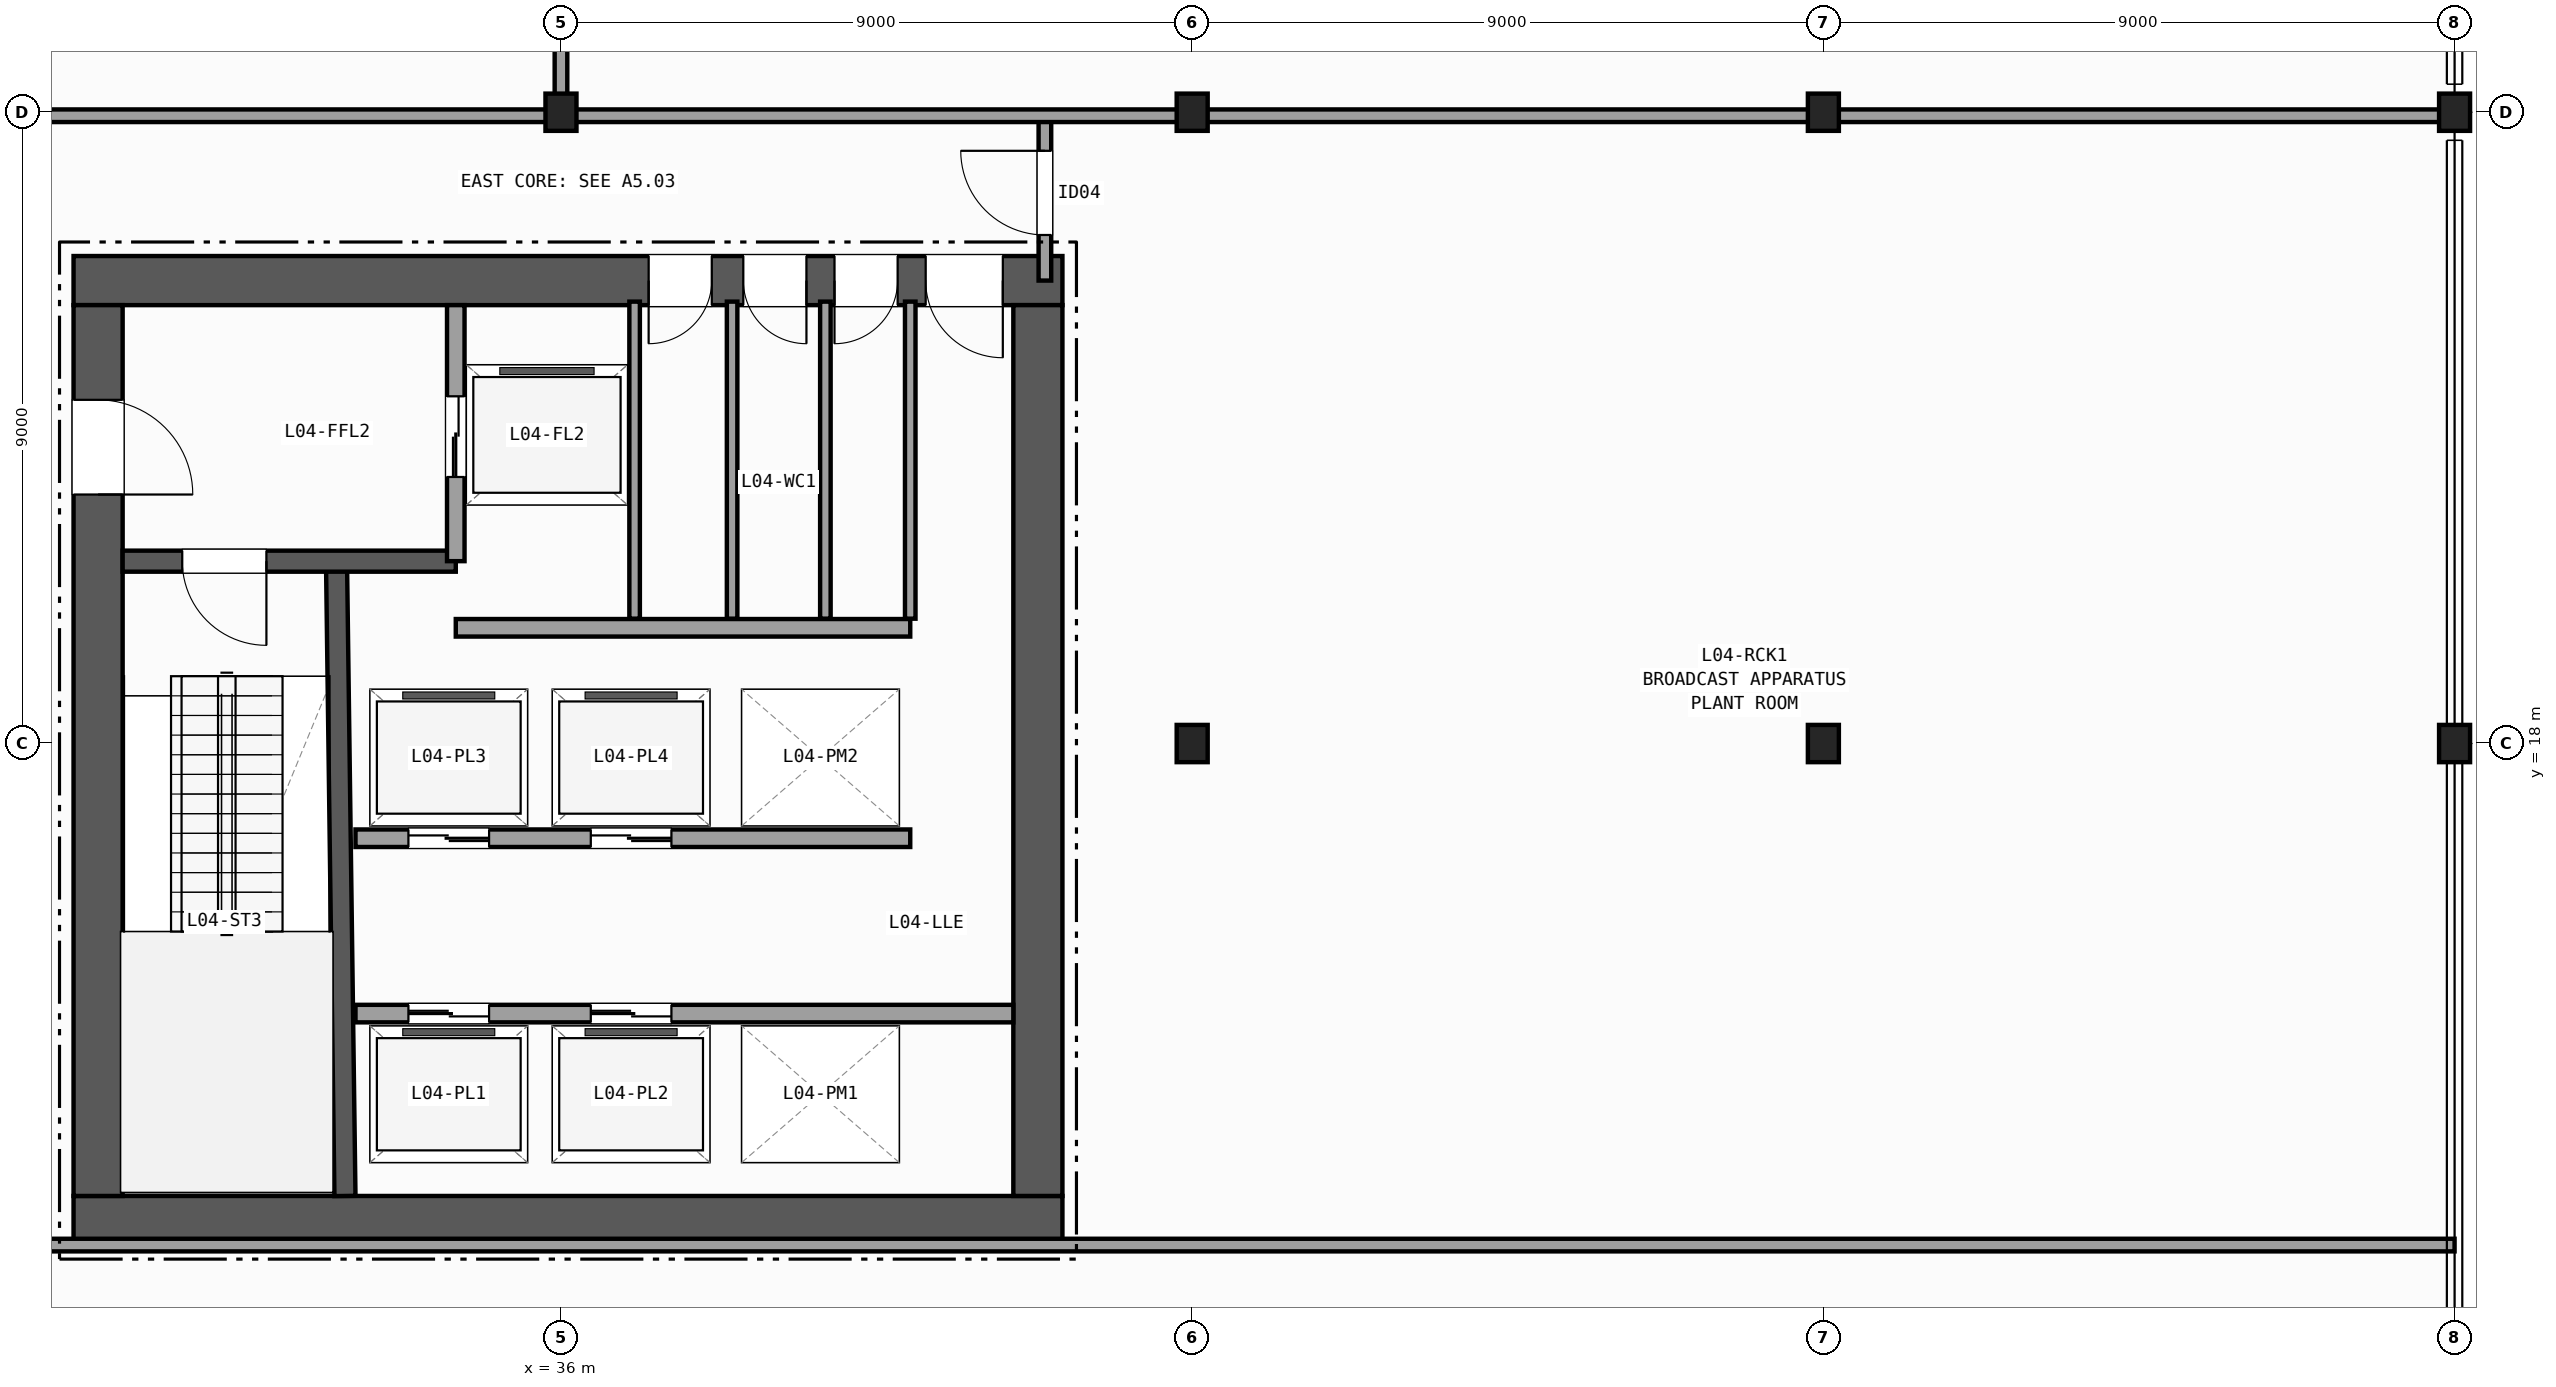
"""IFC4 building model, lengths in metres.
Left out: names, types, materials, properties, quantities, classifications, styles, units other than length and angle.
Written with IfcOpenShell. Run it as: python <this file> out.ifc"""

import sys

from ifc_helpers import new_model, si_unit, direction, frame, frame_2d, origin, origin_2d, place, context, subcontext, project, spatial, rectangle, i_section, extrude, element, fill, save


model = new_model("IFC4")
c1 = context("Model", 3, precision=1e-05, world=origin(), true_north=direction((0.0, 1.0)))
c2 = subcontext(c1, "Body", "Model", "MODEL_VIEW")
j1 = project(units=[si_unit("LENGTHUNIT", "METRE"), si_unit("PLANEANGLEUNIT", "RADIAN")], contexts=[c1])
p1 = place(None, origin())
s1 = spatial("IfcSite", under=j1, at=p1, CompositionType="ELEMENT")
p2 = place(p1, origin())
s2 = spatial("IfcBuilding", under=s1, at=p2, CompositionType="ELEMENT")
p3 = place(p2, frame((0.0, 0.0, 21.2)))
s3 = spatial("IfcBuildingStorey", under=s2, at=p3, CompositionType="ELEMENT", Elevation=21.2)
for number, where, z_axis, x_axis in (
    (1, (36.0, 27.0, 0.0), (0.0, 0.0, 1.0), (1.0, 0.0, 0.0)),
    (2, (45.0, 18.0, 0.0), (0.0, 0.0, 1.0), (1.0, 0.0, 0.0)),
    (3, (45.0, 27.0, 0.0), (0.0, 0.0, 1.0), (1.0, 0.0, 0.0)),
    (4, (54.0, 18.0, 0.0), (0.0, 0.0, 1.0), (1.0, 0.0, 0.0)),
    (5, (54.0, 27.0, 0.0), (0.0, 0.0, 1.0), (1.0, 0.0, 0.0)),
    (6, (63.0, 18.0, 0.0), (0.0, 0.0, 1.0), (1.0, 0.0, 0.0)),
    (7, (63.0, 27.0, 0.0), (0.0, 0.0, 1.0), (1.0, 0.0, 0.0)),
):
    element("IfcColumn", number, at=place(p3, frame(where, z_axis=z_axis, x_axis=x_axis)), inside=s3, PredefinedType="COLUMN", context=c2, shape_type="SweptSolid", body=[
        extrude(i_section(OverallWidth=0.442, OverallDepth=0.531, WebThickness=0.066, FlangeThickness=0.106, FilletRadius=0.015, at=origin_2d()), origin(), (0.0, 0.0, 1.0), 4.8),
    ])
p4 = place(p3, frame((29.05, 11.2, 0.0), z_axis=(0.0, 0.0, 1.0), x_axis=(1.0, 0.0, 0.0)))
e8 = element("IfcWall", 8, at=p4, inside=s3, PredefinedType="SHEAR", context=c2, shape_type="SweptSolid", body=[
    extrude(rectangle(XDim=14.1, YDim=0.7, at=frame_2d((7.05, 0.0))), origin(), (0.0, 0.0, 1.0), 4.48),
])
p5 = place(p3, frame((43.15, 24.6, 0.0), z_axis=(0.0, 0.0, 1.0), x_axis=(-1.0, 0.0, 0.0)))
e9 = element("IfcWall", 9, at=p5, inside=s3, PredefinedType="SHEAR", context=c2, shape_type="SweptSolid", body=[
    extrude(rectangle(XDim=14.1, YDim=0.7, at=frame_2d((7.05, 0.0))), origin(), (0.0, 0.0, 1.0), 4.48),
])
p6 = place(p5, frame((0.85, 0.0, 0.0)))
e10 = element("IfcOpeningElement", 10, at=p6, cuts=e9, PredefinedType="OPENING", context=c2, shape_type="SweptSolid", body=[
    extrude(rectangle(XDim=1.1, YDim=2.15, at=frame_2d((0.55, 1.075))), frame((0.0, 0.36, 0.0), z_axis=(0.0, -1.0, 0.0), x_axis=(1.0, 0.0, 0.0)), (0.0, 0.0, 1.0), 0.72),
])
p7 = place(p5, frame((2.35, 0.0, 0.0)))
e11 = element("IfcOpeningElement", 11, at=p7, cuts=e9, PredefinedType="OPENING", context=c2, shape_type="SweptSolid", body=[
    extrude(rectangle(XDim=0.9, YDim=2.1, at=frame_2d((0.45, 1.05))), frame((0.0, 0.36, 0.0), z_axis=(0.0, -1.0, 0.0), x_axis=(1.0, 0.0, 0.0)), (0.0, 0.0, 1.0), 0.72),
])
p8 = place(p5, frame((3.65, 0.0, 0.0)))
e12 = element("IfcOpeningElement", 12, at=p8, cuts=e9, PredefinedType="OPENING", context=c2, shape_type="SweptSolid", body=[
    extrude(rectangle(XDim=0.9, YDim=2.1, at=frame_2d((0.45, 1.05))), frame((0.0, 0.36, 0.0), z_axis=(0.0, -1.0, 0.0), x_axis=(1.0, 0.0, 0.0)), (0.0, 0.0, 1.0), 0.72),
])
p9 = place(p5, frame((5.0, 0.0, 0.0)))
e13 = element("IfcOpeningElement", 13, at=p9, cuts=e9, PredefinedType="OPENING", context=c2, shape_type="SweptSolid", body=[
    extrude(rectangle(XDim=0.9, YDim=2.1, at=frame_2d((0.45, 1.05))), frame((0.0, 0.36, 0.0), z_axis=(0.0, -1.0, 0.0), x_axis=(1.0, 0.0, 0.0)), (0.0, 0.0, 1.0), 0.72),
])
p10 = place(p3, frame((29.4, 24.25, 0.0), z_axis=(0.0, 0.0, 1.0), x_axis=(0.0, -1.0, 0.0)))
e14 = element("IfcWall", 14, at=p10, inside=s3, PredefinedType="SHEAR", context=c2, shape_type="SweptSolid", body=[
    extrude(rectangle(XDim=12.7, YDim=0.7, at=frame_2d((6.35, 0.0))), origin(), (0.0, 0.0, 1.0), 4.48),
])
p11 = place(p10, frame((1.35, 0.0, 0.0)))
e15 = element("IfcOpeningElement", 15, at=p11, cuts=e14, PredefinedType="OPENING", context=c2, shape_type="SweptSolid", body=[
    extrude(rectangle(XDim=1.35, YDim=2.15, at=frame_2d((0.675, 1.075))), frame((0.0, 0.36, 0.0), z_axis=(0.0, -1.0, 0.0), x_axis=(1.0, 0.0, 0.0)), (0.0, 0.0, 1.0), 0.72),
])
p12 = place(p3, frame((42.8, 11.55, 0.0), z_axis=(0.0, 0.0, 1.0), x_axis=(0.0, 1.0, 0.0)))
e16 = element("IfcWall", 16, at=p12, inside=s3, PredefinedType="SHEAR", context=c2, shape_type="SweptSolid", body=[
    extrude(rectangle(XDim=12.7, YDim=0.7, at=frame_2d((6.35, 0.0))), origin(), (0.0, 0.0, 1.0), 4.48),
])
p13 = place(p3, frame((32.92, 11.55, 0.0), z_axis=(0.0, 0.0, 1.0), x_axis=(-0.01331804616, 0.99991131089, 0.0)))
e17 = element("IfcWall", 17, at=p13, inside=s3, PredefinedType="SHEAR", context=c2, shape_type="SweptSolid", body=[
    extrude(rectangle(XDim=9.001, YDim=0.3, at=frame_2d((4.5, 0.0))), origin(), (0.0, 0.0, 1.0), 4.48),
])
p14 = place(p3, frame((34.5, 20.6, 0.0), z_axis=(0.0, 0.0, 1.0), x_axis=(-1.0, 0.0, 0.0)))
e18 = element("IfcWall", 18, at=p14, inside=s3, PredefinedType="SHEAR", context=c2, shape_type="SweptSolid", body=[
    extrude(rectangle(XDim=4.75, YDim=0.3, at=frame_2d((2.375, 0.0))), origin(), (0.0, 0.0, 1.0), 4.48),
])
p15 = place(p14, frame((2.7, 0.0, 0.0)))
e19 = element("IfcOpeningElement", 19, at=p15, cuts=e18, PredefinedType="OPENING", context=c2, shape_type="SweptSolid", body=[
    extrude(rectangle(XDim=1.2, YDim=2.15, at=frame_2d((0.6, 1.075))), frame((0.0, 0.16, 0.0), z_axis=(0.0, -1.0, 0.0), x_axis=(1.0, 0.0, 0.0)), (0.0, 0.0, 1.0), 0.32),
])
p16 = place(p3, frame((34.5, 20.6, 0.0), z_axis=(0.0, 0.0, 1.0), x_axis=(0.0, 1.0, 0.0)))
e20 = element("IfcWall", 20, at=p16, inside=s3, PredefinedType="PARTITIONING", context=c2, shape_type="SweptSolid", body=[
    extrude(rectangle(XDim=3.65, YDim=0.25, at=frame_2d((1.825, 0.0))), origin(), (0.0, 0.0, 1.0), 4.48),
])
p17 = place(p16, frame((1.2, 0.0, 0.0)))
e21 = element("IfcOpeningElement", 21, at=p17, cuts=e20, PredefinedType="OPENING", context=c2, shape_type="SweptSolid", body=[
    extrude(rectangle(XDim=1.15, YDim=2.15, at=frame_2d((0.575, 1.075))), frame((0.0, 0.135, 0.0), z_axis=(0.0, -1.0, 0.0), x_axis=(1.0, 0.0, 0.0)), (0.0, 0.0, 1.0), 0.27),
])
p18 = place(p3, frame((34.5, 19.65, 0.0), z_axis=(0.0, 0.0, 1.0), x_axis=(1.0, 0.0, 0.0)))
e22 = element("IfcWall", 22, at=p18, inside=s3, PredefinedType="PARTITIONING", context=c2, shape_type="SweptSolid", body=[
    extrude(rectangle(XDim=6.48, YDim=0.25, at=frame_2d((3.24, 0.0))), origin(), (0.0, 0.0, 1.0), 4.48),
])
p19 = place(p3, frame((33.07, 14.15, 0.0), z_axis=(0.0, 0.0, 1.0), x_axis=(1.0, 0.0, 0.0)))
e23 = element("IfcWall", 23, at=p19, inside=s3, PredefinedType="PARTITIONING", context=c2, shape_type="SweptSolid", body=[
    extrude(rectangle(XDim=9.38, YDim=0.25, at=frame_2d((4.69, 0.0))), origin(), (0.0, 0.0, 1.0), 4.48),
])
p20 = place(p19, frame((0.755, 0.0, 0.0)))
e24 = element("IfcOpeningElement", 24, at=p20, cuts=e23, PredefinedType="OPENING", context=c2, shape_type="SweptSolid", body=[
    extrude(rectangle(XDim=1.15, YDim=2.15, at=frame_2d((0.575, 1.075))), frame((0.0, 0.135, 0.0), z_axis=(0.0, -1.0, 0.0), x_axis=(1.0, 0.0, 0.0)), (0.0, 0.0, 1.0), 0.27),
])
p21 = place(p19, frame((3.355, 0.0, 0.0)))
e25 = element("IfcOpeningElement", 25, at=p21, cuts=e23, PredefinedType="OPENING", context=c2, shape_type="SweptSolid", body=[
    extrude(rectangle(XDim=1.15, YDim=2.15, at=frame_2d((0.575, 1.075))), frame((0.0, 0.135, 0.0), z_axis=(0.0, -1.0, 0.0), x_axis=(1.0, 0.0, 0.0)), (0.0, 0.0, 1.0), 0.27),
])
p22 = place(p3, frame((40.98, 16.65, 0.0), z_axis=(0.0, 0.0, 1.0), x_axis=(-1.0, 0.0, 0.0)))
e26 = element("IfcWall", 26, at=p22, inside=s3, PredefinedType="PARTITIONING", context=c2, shape_type="SweptSolid", body=[
    extrude(rectangle(XDim=7.91, YDim=0.25, at=frame_2d((3.955, 0.0))), origin(), (0.0, 0.0, 1.0), 4.48),
])
p23 = place(p22, frame((6.005, 0.0, 0.0)))
e27 = element("IfcOpeningElement", 27, at=p23, cuts=e26, PredefinedType="OPENING", context=c2, shape_type="SweptSolid", body=[
    extrude(rectangle(XDim=1.15, YDim=2.15, at=frame_2d((0.575, 1.075))), frame((0.0, 0.135, 0.0), z_axis=(0.0, -1.0, 0.0), x_axis=(1.0, 0.0, 0.0)), (0.0, 0.0, 1.0), 0.27),
])
p24 = place(p22, frame((3.405, 0.0, 0.0)))
e28 = element("IfcOpeningElement", 28, at=p24, cuts=e26, PredefinedType="OPENING", context=c2, shape_type="SweptSolid", body=[
    extrude(rectangle(XDim=1.15, YDim=2.15, at=frame_2d((0.575, 1.075))), frame((0.0, 0.135, 0.0), z_axis=(0.0, -1.0, 0.0), x_axis=(1.0, 0.0, 0.0)), (0.0, 0.0, 1.0), 0.27),
])
for number, where, z_axis, x_axis in (
    (29, (37.05, 19.78, 0.0), (0.0, 0.0, 1.0), (0.0, 1.0, 0.0)),
    (30, (38.44, 19.78, 0.0), (0.0, 0.0, 1.0), (0.0, 1.0, 0.0)),
    (31, (39.77, 19.78, 0.0), (0.0, 0.0, 1.0), (0.0, 1.0, 0.0)),
    (32, (40.98, 19.78, 0.0), (0.0, 0.0, 1.0), (0.0, 1.0, 0.0)),
):
    element("IfcWall", number, at=place(p3, frame(where, z_axis=z_axis, x_axis=x_axis)), inside=s3, PredefinedType="PARTITIONING", context=c2, shape_type="SweptSolid", body=[
        extrude(rectangle(XDim=4.52, YDim=0.15, at=frame_2d((2.26, 0.0))), origin(), (0.0, 0.0, 1.0), 4.48),
    ])
p25 = place(p3, frame((24.65, 10.85, 0.0), z_axis=(0.0, 0.0, 1.0), x_axis=(1.0, 0.0, 0.0)))
e33 = element("IfcWall", 33, at=p25, inside=s3, PredefinedType="PARTITIONING", context=c2, shape_type="SweptSolid", body=[
    extrude(rectangle(XDim=38.35, YDim=0.18, at=frame_2d((19.175, 0.0))), origin(), (0.0, 0.0, 1.0), 3.605),
])
p26 = place(p25, frame((2.0, 0.0, 0.0)))
e34 = element("IfcOpeningElement", 34, at=p26, cuts=e33, PredefinedType="OPENING", context=c2, shape_type="SweptSolid", body=[
    extrude(rectangle(XDim=1.2, YDim=2.15, at=frame_2d((0.6, 1.075))), frame((0.0, 0.1, 0.0), z_axis=(0.0, -1.0, 0.0), x_axis=(1.0, 0.0, 0.0)), (0.0, 0.0, 1.0), 0.2),
])
p27 = place(p3, frame((42.9, 24.6, 0.0), z_axis=(0.0, 0.0, 1.0), x_axis=(0.0, 1.0, 0.0)))
e35 = element("IfcWall", 35, at=p27, inside=s3, PredefinedType="PARTITIONING", context=c2, shape_type="SweptSolid", body=[
    extrude(rectangle(XDim=2.35, YDim=0.18, at=frame_2d((1.175, 0.0))), origin(), (0.0, 0.0, 1.0), 3.533),
])
p28 = place(p27, frame((0.65, 0.0, 0.0)))
e36 = element("IfcOpeningElement", 36, at=p28, cuts=e35, PredefinedType="OPENING", context=c2, shape_type="SweptSolid", body=[
    extrude(rectangle(XDim=1.2, YDim=2.15, at=frame_2d((0.6, 1.075))), frame((0.0, 0.1, 0.0), z_axis=(0.0, -1.0, 0.0), x_axis=(1.0, 0.0, 0.0)), (0.0, 0.0, 1.0), 0.2),
])
p29 = place(p3, frame((27.1, 26.95, 0.0), z_axis=(0.0, 0.0, 1.0), x_axis=(1.0, 0.0, 0.0)))
e37 = element("IfcWall", 37, at=p29, inside=s3, PredefinedType="PARTITIONING", context=c2, shape_type="SweptSolid", body=[
    extrude(rectangle(XDim=35.9, YDim=0.18, at=frame_2d((17.95, 0.0))), origin(), (0.0, 0.0, 1.0), 3.533),
])
p30 = place(p3, frame((36.0, 26.95, 0.0), z_axis=(0.0, 0.0, 1.0), x_axis=(0.0, 1.0, 0.0)))
e38 = element("IfcWall", 38, at=p30, inside=s3, PredefinedType="PARTITIONING", context=c2, shape_type="SweptSolid", body=[
    extrude(rectangle(XDim=27.05, YDim=0.18, at=frame_2d((13.525, 0.0))), origin(), (0.0, 0.0, 1.0), 3.533),
])
p31 = place(p30, frame((4.5, 0.0, 0.0)))
e39 = element("IfcOpeningElement", 39, at=p31, cuts=e38, PredefinedType="OPENING", context=c2, shape_type="SweptSolid", body=[
    extrude(rectangle(XDim=1.0, YDim=2.1, at=frame_2d((0.5, 1.05))), frame((0.0, 0.1, 0.0), z_axis=(0.0, -1.0, 0.0), x_axis=(1.0, 0.0, 0.0)), (0.0, 0.0, 1.0), 0.2),
])
p32 = place(p15, origin())
e40 = element("IfcDoor", 40, at=p32, inside=s3, OperationType="SINGLE_SWING_LEFT", PredefinedType="DOOR", context=c2, shape_type="SweptSolid", body=[
    extrude(rectangle(XDim=1.2, YDim=2.15, at=frame_2d((0.6, 1.075))), frame((0.0, 0.025, 0.0), z_axis=(0.0, -1.0, 0.0), x_axis=(1.0, 0.0, 0.0)), (0.0, 0.0, 1.0), 0.05),
])
fill(e19, e40)
p33 = place(p11, origin())
e41 = element("IfcDoor", 41, at=p33, inside=s3, OperationType="SINGLE_SWING_RIGHT", PredefinedType="DOOR", context=c2, shape_type="SweptSolid", body=[
    extrude(rectangle(XDim=1.35, YDim=2.15, at=frame_2d((0.675, 1.075))), frame((0.0, 0.025, 0.0), z_axis=(0.0, -1.0, 0.0), x_axis=(1.0, 0.0, 0.0)), (0.0, 0.0, 1.0), 0.05),
])
fill(e15, e41)
p34 = place(p6, origin())
e42 = element("IfcDoor", 42, at=p34, inside=s3, OperationType="SINGLE_SWING_LEFT", PredefinedType="DOOR", context=c2, shape_type="SweptSolid", body=[
    extrude(rectangle(XDim=1.1, YDim=2.15, at=frame_2d((0.55, 1.075))), frame((0.0, 0.025, 0.0), z_axis=(0.0, -1.0, 0.0), x_axis=(1.0, 0.0, 0.0)), (0.0, 0.0, 1.0), 0.05),
])
fill(e10, e42)
p35 = place(p7, origin())
e43 = element("IfcDoor", 43, at=p35, inside=s3, OperationType="SINGLE_SWING_RIGHT", PredefinedType="DOOR", context=c2, shape_type="SweptSolid", body=[
    extrude(rectangle(XDim=0.9, YDim=2.1, at=frame_2d((0.45, 1.05))), frame((0.0, 0.025, 0.0), z_axis=(0.0, -1.0, 0.0), x_axis=(1.0, 0.0, 0.0)), (0.0, 0.0, 1.0), 0.05),
])
fill(e11, e43)
p36 = place(p8, origin())
e44 = element("IfcDoor", 44, at=p36, inside=s3, OperationType="SINGLE_SWING_LEFT", PredefinedType="DOOR", context=c2, shape_type="SweptSolid", body=[
    extrude(rectangle(XDim=0.9, YDim=2.1, at=frame_2d((0.45, 1.05))), frame((0.0, 0.025, 0.0), z_axis=(0.0, -1.0, 0.0), x_axis=(1.0, 0.0, 0.0)), (0.0, 0.0, 1.0), 0.05),
])
fill(e12, e44)
p37 = place(p9, origin())
e45 = element("IfcDoor", 45, at=p37, inside=s3, OperationType="SINGLE_SWING_RIGHT", PredefinedType="DOOR", context=c2, shape_type="SweptSolid", body=[
    extrude(rectangle(XDim=0.9, YDim=2.1, at=frame_2d((0.45, 1.05))), frame((0.0, 0.025, 0.0), z_axis=(0.0, -1.0, 0.0), x_axis=(1.0, 0.0, 0.0)), (0.0, 0.0, 1.0), 0.05),
])
fill(e13, e45)
p38 = place(p17, origin())
e46 = element("IfcDoor", 46, at=p38, inside=s3, OperationType="DOUBLE_DOOR_SLIDING", PredefinedType="DOOR", context=c2, shape_type="SweptSolid", body=[
    extrude(rectangle(XDim=1.15, YDim=2.15, at=frame_2d((0.575, 1.075))), frame((0.0, 0.025, 0.0), z_axis=(0.0, -1.0, 0.0), x_axis=(1.0, 0.0, 0.0)), (0.0, 0.0, 1.0), 0.05),
])
fill(e21, e46)
p39 = place(p20, origin())
e47 = element("IfcDoor", 47, at=p39, inside=s3, OperationType="DOUBLE_DOOR_SLIDING", PredefinedType="DOOR", context=c2, shape_type="SweptSolid", body=[
    extrude(rectangle(XDim=1.15, YDim=2.15, at=frame_2d((0.575, 1.075))), frame((0.0, 0.025, 0.0), z_axis=(0.0, -1.0, 0.0), x_axis=(1.0, 0.0, 0.0)), (0.0, 0.0, 1.0), 0.05),
])
fill(e24, e47)
p40 = place(p21, origin())
e48 = element("IfcDoor", 48, at=p40, inside=s3, OperationType="DOUBLE_DOOR_SLIDING", PredefinedType="DOOR", context=c2, shape_type="SweptSolid", body=[
    extrude(rectangle(XDim=1.15, YDim=2.15, at=frame_2d((0.575, 1.075))), frame((0.0, 0.025, 0.0), z_axis=(0.0, -1.0, 0.0), x_axis=(1.0, 0.0, 0.0)), (0.0, 0.0, 1.0), 0.05),
])
fill(e25, e48)
p41 = place(p23, origin())
e49 = element("IfcDoor", 49, at=p41, inside=s3, OperationType="DOUBLE_DOOR_SLIDING", PredefinedType="DOOR", context=c2, shape_type="SweptSolid", body=[
    extrude(rectangle(XDim=1.15, YDim=2.15, at=frame_2d((0.575, 1.075))), frame((0.0, 0.025, 0.0), z_axis=(0.0, -1.0, 0.0), x_axis=(1.0, 0.0, 0.0)), (0.0, 0.0, 1.0), 0.05),
])
fill(e27, e49)
p42 = place(p24, origin())
e50 = element("IfcDoor", 50, at=p42, inside=s3, OperationType="DOUBLE_DOOR_SLIDING", PredefinedType="DOOR", context=c2, shape_type="SweptSolid", body=[
    extrude(rectangle(XDim=1.15, YDim=2.15, at=frame_2d((0.575, 1.075))), frame((0.0, 0.025, 0.0), z_axis=(0.0, -1.0, 0.0), x_axis=(1.0, 0.0, 0.0)), (0.0, 0.0, 1.0), 0.05),
])
fill(e28, e50)
p43 = place(p28, origin())
e51 = element("IfcDoor", 51, at=p43, inside=s3, OperationType="SINGLE_SWING_RIGHT", PredefinedType="DOOR", context=c2, shape_type="SweptSolid", body=[
    extrude(rectangle(XDim=1.2, YDim=2.15, at=frame_2d((0.6, 1.075))), frame((0.0, 0.025, 0.0), z_axis=(0.0, -1.0, 0.0), x_axis=(1.0, 0.0, 0.0)), (0.0, 0.0, 1.0), 0.05),
])
fill(e36, e51)
save(model, sys.argv[1])
